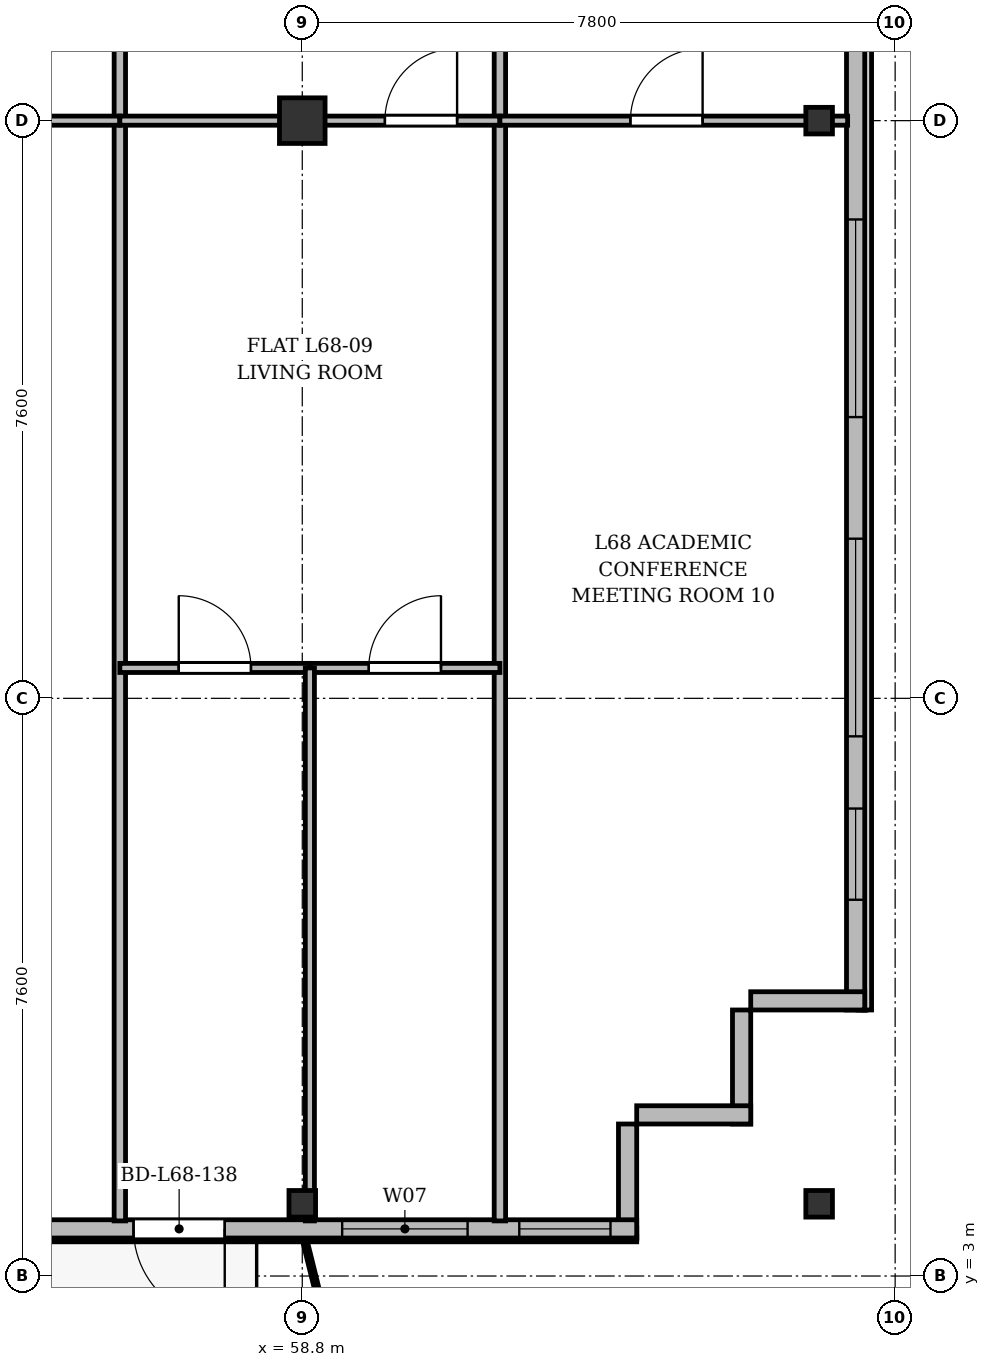
"""IFC4 building model, lengths in metres.
Left out: names, types, materials, properties, quantities, classifications, styles, units other than length and angle.
Written with IfcOpenShell. Run it as: python <this file> out.ifc"""

import sys

from ifc_helpers import new_model, si_unit, direction, frame, frame_2d, origin, origin_2d, place, context, subcontext, project, spatial, rectangle, i_section, extrude, source, transform, mapped, element, fill, save


model = new_model("IFC4")
c1 = context("Model", 3, precision=1e-05, world=origin(), true_north=direction((0.0, 1.0)))
c2 = subcontext(c1, "Body", "Model", "MODEL_VIEW")
j1 = project(units=[si_unit("LENGTHUNIT", "METRE"), si_unit("PLANEANGLEUNIT", "RADIAN")], contexts=[c1])
p1 = place(None, origin())
s1 = spatial("IfcSite", under=j1, at=p1, CompositionType="ELEMENT")
p2 = place(p1, origin())
s2 = spatial("IfcBuilding", under=s1, at=p2, CompositionType="ELEMENT")
p3 = place(p2, frame((0.0, 0.0, 263.1)))
s3 = spatial("IfcBuildingStorey", under=s2, at=p3, CompositionType="ELEMENT", Elevation=263.1)
m1 = source(origin(), c2, "Body", "SweptSolid", [
    extrude(i_section(OverallWidth=0.35, OverallDepth=0.35, WebThickness=0.018, FlangeThickness=0.028, at=origin_2d()), origin(), (0.0, 0.0, 1.0), 3.6),
])
p4 = place(p3, frame((58.8, 3.95, 0.0), z_axis=(0.0, 0.0, 1.0), x_axis=(1.0, 0.0, 0.0)))
e1 = element("IfcColumn", 1, at=p4, inside=s3, PredefinedType="COLUMN", context=c2, shape_type="MappedRepresentation", body=[
    mapped(m1, transform((0.0, 0.0, 0.0), x_axis=(1.0, 0.0, 0.0), y_axis=(0.0, 1.0, 0.0), z_axis=(0.0, 0.0, 1.0), scale=1.0)),
])
m2 = source(origin(), c2, "Body", "SweptSolid", [
    extrude(rectangle(XDim=0.6, YDim=0.6, at=origin_2d()), origin(), (0.0, 0.0, 1.0), 3.6),
])
p5 = place(p3, frame((58.8, 18.2, 0.0), z_axis=(0.0, 0.0, 1.0), x_axis=(1.0, 0.0, 0.0)))
e2 = element("IfcColumn", 2, at=p5, inside=s3, PredefinedType="COLUMN", context=c2, shape_type="MappedRepresentation", body=[
    mapped(m2, transform((0.0, 0.0, 0.0), x_axis=(1.0, 0.0, 0.0), y_axis=(0.0, 1.0, 0.0), z_axis=(0.0, 0.0, 1.0), scale=1.0)),
])
for number, where, z_axis, x_axis in (
    (3, (65.6, 3.95, 0.0), (0.0, 0.0, 1.0), (1.0, 0.0, 0.0)),
    (4, (65.6, 18.2, 0.0), (0.0, 0.0, 1.0), (1.0, 0.0, 0.0)),
):
    element("IfcColumn", number, at=place(p3, frame(where, z_axis=z_axis, x_axis=x_axis)), inside=s3, PredefinedType="COLUMN", context=c2, shape_type="MappedRepresentation", body=[
        mapped(m1, transform((0.0, 0.0, 0.0), x_axis=(1.0, 0.0, 0.0), y_axis=(0.0, 1.0, 0.0), z_axis=(0.0, 0.0, 1.0), scale=1.0)),
    ])
p6 = place(p3, frame((66.08, 45.5, 0.0), z_axis=(0.0, 0.0, 1.0), x_axis=(0.0, -1.0, 0.0)))
e5 = element("IfcWall", 5, at=p6, inside=s3, PredefinedType="SOLIDWALL", context=c2, shape_type="SweptSolid", body=[
    extrude(rectangle(XDim=39.0, YDim=0.24, at=frame_2d((19.5, 0.0))), origin(), (0.0, 0.0, 1.0), 3.37),
])
p7 = place(p6, frame((36.35, 0.0, 0.92)))
e6 = element("IfcOpeningElement", 6, at=p7, cuts=e5, PredefinedType="OPENING", context=c2, shape_type="SweptSolid", body=[
    extrude(rectangle(XDim=1.2, YDim=1.65, at=frame_2d((0.6, 0.825))), frame((0.0, 0.13, 0.0), z_axis=(0.0, -1.0, 0.0), x_axis=(1.0, 0.0, 0.0)), (0.0, 0.0, 1.0), 0.26),
])
p8 = place(p6, frame((32.8, 0.0, 0.92)))
e7 = element("IfcOpeningElement", 7, at=p8, cuts=e5, PredefinedType="OPENING", context=c2, shape_type="SweptSolid", body=[
    extrude(rectangle(XDim=2.6, YDim=1.9, at=frame_2d((1.3, 0.95))), frame((0.0, 0.13, 0.0), z_axis=(0.0, -1.0, 0.0), x_axis=(1.0, 0.0, 0.0)), (0.0, 0.0, 1.0), 0.26),
])
p9 = place(p6, frame((28.6, 0.0, 0.92)))
e8 = element("IfcOpeningElement", 8, at=p9, cuts=e5, PredefinedType="OPENING", context=c2, shape_type="SweptSolid", body=[
    extrude(rectangle(XDim=2.6, YDim=1.9, at=frame_2d((1.3, 0.95))), frame((0.0, 0.13, 0.0), z_axis=(0.0, -1.0, 0.0), x_axis=(1.0, 0.0, 0.0)), (0.0, 0.0, 1.0), 0.26),
])
p10 = place(p6, frame((21.4, 0.0, 0.92)))
e9 = element("IfcOpeningElement", 9, at=p10, cuts=e5, PredefinedType="OPENING", context=c2, shape_type="SweptSolid", body=[
    extrude(rectangle(XDim=2.6, YDim=1.9, at=frame_2d((1.3, 0.95))), frame((0.0, 0.13, 0.0), z_axis=(0.0, -1.0, 0.0), x_axis=(1.0, 0.0, 0.0)), (0.0, 0.0, 1.0), 0.26),
])
p11 = place(p6, frame((7.4, 0.0, 0.92)))
e10 = element("IfcOpeningElement", 10, at=p11, cuts=e5, PredefinedType="OPENING", context=c2, shape_type="SweptSolid", body=[
    extrude(rectangle(XDim=2.6, YDim=1.9, at=frame_2d((1.3, 0.95))), frame((0.0, 0.13, 0.0), z_axis=(0.0, -1.0, 0.0), x_axis=(1.0, 0.0, 0.0)), (0.0, 0.0, 1.0), 0.26),
])
p12 = place(p6, frame((4.5, 0.0, 0.92)))
e11 = element("IfcOpeningElement", 11, at=p12, cuts=e5, PredefinedType="OPENING", context=c2, shape_type="SweptSolid", body=[
    extrude(rectangle(XDim=1.2, YDim=1.65, at=frame_2d((0.6, 0.825))), frame((0.0, 0.13, 0.0), z_axis=(0.0, -1.0, 0.0), x_axis=(1.0, 0.0, 0.0)), (0.0, 0.0, 1.0), 0.26),
])
p13 = place(p6, frame((1.15, 0.0, 0.92)))
e12 = element("IfcOpeningElement", 12, at=p13, cuts=e5, PredefinedType="OPENING", context=c2, shape_type="SweptSolid", body=[
    extrude(rectangle(XDim=1.2, YDim=1.65, at=frame_2d((0.6, 0.825))), frame((0.0, 0.13, 0.0), z_axis=(0.0, -1.0, 0.0), x_axis=(1.0, 0.0, 0.0)), (0.0, 0.0, 1.0), 0.26),
])
p14 = place(p3, frame((66.2, 6.62, 0.0), z_axis=(0.0, 0.0, 1.0), x_axis=(-1.0, 0.0, 0.0)))
e13 = element("IfcWall", 13, at=p14, inside=s3, PredefinedType="SOLIDWALL", context=c2, shape_type="SweptSolid", body=[
    extrude(rectangle(XDim=1.5, YDim=0.24, at=frame_2d((0.75, 0.0))), origin(), (0.0, 0.0, 1.0), 2.87),
])
for number, where, z_axis, x_axis in (
    (14, (64.58, 6.5, 0.0), (0.0, 0.0, 1.0), (0.0, -1.0, 0.0)),
    (15, (64.7, 5.12, 0.0), (0.0, 0.0, 1.0), (-1.0, 0.0, 0.0)),
):
    element("IfcWall", number, at=place(p3, frame(where, z_axis=z_axis, x_axis=x_axis)), inside=s3, PredefinedType="SOLIDWALL", context=c2, shape_type="SweptSolid", body=[
        extrude(rectangle(XDim=1.5, YDim=0.24, at=frame_2d((0.75, 0.0))), origin(), (0.0, 0.0, 1.0), 3.37),
    ])
p15 = place(p3, frame((63.08, 5.0, 0.0), z_axis=(0.0, 0.0, 1.0), x_axis=(0.0, -1.0, 0.0)))
e16 = element("IfcWall", 16, at=p15, inside=s3, PredefinedType="SOLIDWALL", context=c2, shape_type="SweptSolid", body=[
    extrude(rectangle(XDim=1.5, YDim=0.24, at=frame_2d((0.75, 0.0))), origin(), (0.0, 0.0, 1.0), 2.92),
])
p16 = place(p3, frame((63.2, 3.62, 0.0), z_axis=(0.0, 0.0, 1.0), x_axis=(-1.0, 0.0, 0.0)))
e17 = element("IfcWall", 17, at=p16, inside=s3, PredefinedType="SOLIDWALL", context=c2, shape_type="SweptSolid", body=[
    extrude(rectangle(XDim=52.0, YDim=0.24, at=frame_2d((26.0, 0.0))), origin(), (0.0, 0.0, 1.0), 3.37),
])
p17 = place(p16, frame((0.345, 0.0, 0.9)))
e18 = element("IfcOpeningElement", 18, at=p17, cuts=e17, PredefinedType="OPENING", context=c2, shape_type="SweptSolid", body=[
    extrude(rectangle(XDim=1.2, YDim=1.65, at=frame_2d((0.6, 0.825))), frame((0.0, 0.13, 0.0), z_axis=(0.0, -1.0, 0.0), x_axis=(1.0, 0.0, 0.0)), (0.0, 0.0, 1.0), 0.26),
])
p18 = place(p16, frame((2.225, 0.0, 0.9)))
e19 = element("IfcOpeningElement", 19, at=p18, cuts=e17, PredefinedType="OPENING", context=c2, shape_type="SweptSolid", body=[
    extrude(rectangle(XDim=1.65, YDim=1.85, at=frame_2d((0.825, 0.925))), frame((0.0, 0.13, 0.0), z_axis=(0.0, -1.0, 0.0), x_axis=(1.0, 0.0, 0.0)), (0.0, 0.0, 1.0), 0.26),
])
p19 = place(p16, frame((5.42, 0.0, 0.0)))
e20 = element("IfcOpeningElement", 20, at=p19, cuts=e17, PredefinedType="OPENING", context=c2, shape_type="SweptSolid", body=[
    extrude(rectangle(XDim=1.2, YDim=2.2, at=frame_2d((0.6, 1.1))), frame((0.0, 0.13, 0.0), z_axis=(0.0, -1.0, 0.0), x_axis=(1.0, 0.0, 0.0)), (0.0, 0.0, 1.0), 0.26),
])
p20 = place(p16, frame((8.4, 0.0, 0.9)))
e21 = element("IfcOpeningElement", 21, at=p20, cuts=e17, PredefinedType="OPENING", context=c2, shape_type="SweptSolid", body=[
    extrude(rectangle(XDim=2.2, YDim=1.8, at=frame_2d((1.1, 0.9))), frame((0.0, 0.13, 0.0), z_axis=(0.0, -1.0, 0.0), x_axis=(1.0, 0.0, 0.0)), (0.0, 0.0, 1.0), 0.26),
])
p21 = place(p16, frame((15.05, 0.0, 0.9)))
e22 = element("IfcOpeningElement", 22, at=p21, cuts=e17, PredefinedType="OPENING", context=c2, shape_type="SweptSolid", body=[
    extrude(rectangle(XDim=1.5, YDim=1.75, at=frame_2d((0.75, 0.875))), frame((0.0, 0.13, 0.0), z_axis=(0.0, -1.0, 0.0), x_axis=(1.0, 0.0, 0.0)), (0.0, 0.0, 1.0), 0.26),
])
p22 = place(p16, frame((20.25, 0.0, 0.9)))
e23 = element("IfcOpeningElement", 23, at=p22, cuts=e17, PredefinedType="OPENING", context=c2, shape_type="SweptSolid", body=[
    extrude(rectangle(XDim=2.0, YDim=1.95, at=frame_2d((1.0, 0.975))), frame((0.0, 0.13, 0.0), z_axis=(0.0, -1.0, 0.0), x_axis=(1.0, 0.0, 0.0)), (0.0, 0.0, 1.0), 0.26),
])
p23 = place(p16, frame((24.125, 0.0, 0.9)))
e24 = element("IfcOpeningElement", 24, at=p23, cuts=e17, PredefinedType="OPENING", context=c2, shape_type="SweptSolid", body=[
    extrude(rectangle(XDim=1.65, YDim=1.85, at=frame_2d((0.825, 0.925))), frame((0.0, 0.13, 0.0), z_axis=(0.0, -1.0, 0.0), x_axis=(1.0, 0.0, 0.0)), (0.0, 0.0, 1.0), 0.26),
])
p24 = place(p16, frame((28.8, 0.0, 0.9)))
e25 = element("IfcOpeningElement", 25, at=p24, cuts=e17, PredefinedType="OPENING", context=c2, shape_type="SweptSolid", body=[
    extrude(rectangle(XDim=1.8, YDim=1.8, at=frame_2d((0.9, 0.9))), frame((0.0, 0.13, 0.0), z_axis=(0.0, -1.0, 0.0), x_axis=(1.0, 0.0, 0.0)), (0.0, 0.0, 1.0), 0.26),
])
p25 = place(p16, frame((34.078, 0.0, 0.0)))
e26 = element("IfcOpeningElement", 26, at=p25, cuts=e17, PredefinedType="OPENING", context=c2, shape_type="SweptSolid", body=[
    extrude(rectangle(XDim=1.2, YDim=2.2, at=frame_2d((0.6, 1.1))), frame((0.0, 0.13, 0.0), z_axis=(0.0, -1.0, 0.0), x_axis=(1.0, 0.0, 0.0)), (0.0, 0.0, 1.0), 0.26),
])
p26 = place(p16, frame((37.25, 0.0, 0.9)))
e27 = element("IfcOpeningElement", 27, at=p26, cuts=e17, PredefinedType="OPENING", context=c2, shape_type="SweptSolid", body=[
    extrude(rectangle(XDim=1.5, YDim=1.75, at=frame_2d((0.75, 0.875))), frame((0.0, 0.13, 0.0), z_axis=(0.0, -1.0, 0.0), x_axis=(1.0, 0.0, 0.0)), (0.0, 0.0, 1.0), 0.26),
])
p27 = place(p16, frame((40.9, 0.0, 0.9)))
e28 = element("IfcOpeningElement", 28, at=p27, cuts=e17, PredefinedType="OPENING", context=c2, shape_type="SweptSolid", body=[
    extrude(rectangle(XDim=2.0, YDim=1.95, at=frame_2d((1.0, 0.975))), frame((0.0, 0.13, 0.0), z_axis=(0.0, -1.0, 0.0), x_axis=(1.0, 0.0, 0.0)), (0.0, 0.0, 1.0), 0.26),
])
p28 = place(p16, frame((44.19, 0.0, 0.9)))
e29 = element("IfcOpeningElement", 29, at=p28, cuts=e17, PredefinedType="OPENING", context=c2, shape_type="SweptSolid", body=[
    extrude(rectangle(XDim=1.65, YDim=1.85, at=frame_2d((0.825, 0.925))), frame((0.0, 0.13, 0.0), z_axis=(0.0, -1.0, 0.0), x_axis=(1.0, 0.0, 0.0)), (0.0, 0.0, 1.0), 0.26),
])
p29 = place(p16, frame((49.855, 0.0, 0.9)))
e30 = element("IfcOpeningElement", 30, at=p29, cuts=e17, PredefinedType="OPENING", context=c2, shape_type="SweptSolid", body=[
    extrude(rectangle(XDim=1.8, YDim=1.8, at=frame_2d((0.9, 0.9))), frame((0.0, 0.13, 0.0), z_axis=(0.0, -1.0, 0.0), x_axis=(1.0, 0.0, 0.0)), (0.0, 0.0, 1.0), 0.26),
])
for number, where, z_axis, x_axis in (
    (31, (56.4, 3.725, 0.0), (0.0, 0.0, 1.0), (0.0, 1.0, 0.0)),
    (32, (61.4, 3.725, 0.0), (0.0, 0.0, 1.0), (0.0, 1.0, 0.0)),
):
    element("IfcWall", number, at=place(p3, frame(where, z_axis=z_axis, x_axis=x_axis)), inside=s3, PredefinedType="PARTITIONING", context=c2, shape_type="SweptSolid", body=[
        extrude(rectangle(XDim=27.275, YDim=0.15, at=frame_2d((13.637, 0.0))), origin(), (0.0, 0.0, 1.0), 2.92),
    ])
p30 = place(p3, frame((51.0, 18.2, 0.0), z_axis=(0.0, 0.0, 1.0), x_axis=(1.0, 0.0, 0.0)))
e33 = element("IfcWall", 33, at=p30, inside=s3, PredefinedType="PARTITIONING", context=c2, shape_type="SweptSolid", body=[
    extrude(rectangle(XDim=5.4, YDim=0.12, at=frame_2d((2.7, 0.0))), origin(), (0.0, 0.0, 1.0), 2.92),
])
p31 = place(p30, frame((2.225, 0.0, 0.0)))
e34 = element("IfcOpeningElement", 34, at=p31, cuts=e33, PredefinedType="OPENING", context=c2, shape_type="SweptSolid", body=[
    extrude(rectangle(XDim=0.95, YDim=2.15, at=frame_2d((0.475, 1.075))), frame((0.0, 0.07, 0.0), z_axis=(0.0, -1.0, 0.0), x_axis=(1.0, 0.0, 0.0)), (0.0, 0.0, 1.0), 0.14),
])
p32 = place(p3, frame((56.4, 18.2, 0.0), z_axis=(0.0, 0.0, 1.0), x_axis=(1.0, 0.0, 0.0)))
e35 = element("IfcWall", 35, at=p32, inside=s3, PredefinedType="PARTITIONING", context=c2, shape_type="SweptSolid", body=[
    extrude(rectangle(XDim=5.0, YDim=0.12, at=frame_2d((2.5, 0.0))), origin(), (0.0, 0.0, 1.0), 2.92),
])
p33 = place(p32, frame((3.487, 0.0, 0.0)))
e36 = element("IfcOpeningElement", 36, at=p33, cuts=e35, PredefinedType="OPENING", context=c2, shape_type="SweptSolid", body=[
    extrude(rectangle(XDim=0.95, YDim=2.15, at=frame_2d((0.475, 1.075))), frame((0.0, 0.07, 0.0), z_axis=(0.0, -1.0, 0.0), x_axis=(1.0, 0.0, 0.0)), (0.0, 0.0, 1.0), 0.14),
])
p34 = place(p3, frame((56.4, 11.0, 0.0), z_axis=(0.0, 0.0, 1.0), x_axis=(1.0, 0.0, 0.0)))
e37 = element("IfcWall", 37, at=p34, inside=s3, PredefinedType="PARTITIONING", context=c2, shape_type="SweptSolid", body=[
    extrude(rectangle(XDim=2.5, YDim=0.12, at=frame_2d((1.25, 0.0))), origin(), (0.0, 0.0, 1.0), 2.87),
])
p35 = place(p34, frame((0.775, 0.0, 0.0)))
e38 = element("IfcOpeningElement", 38, at=p35, cuts=e37, PredefinedType="OPENING", context=c2, shape_type="SweptSolid", body=[
    extrude(rectangle(XDim=0.95, YDim=2.15, at=frame_2d((0.475, 1.075))), frame((0.0, 0.07, 0.0), z_axis=(0.0, -1.0, 0.0), x_axis=(1.0, 0.0, 0.0)), (0.0, 0.0, 1.0), 0.14),
])
p36 = place(p3, frame((58.9, 11.0, 0.0), z_axis=(0.0, 0.0, 1.0), x_axis=(1.0, 0.0, 0.0)))
e39 = element("IfcWall", 39, at=p36, inside=s3, PredefinedType="PARTITIONING", context=c2, shape_type="SweptSolid", body=[
    extrude(rectangle(XDim=2.5, YDim=0.12, at=frame_2d((1.25, 0.0))), origin(), (0.0, 0.0, 1.0), 3.37),
])
p37 = place(p36, frame((0.775, 0.0, 0.0)))
e40 = element("IfcOpeningElement", 40, at=p37, cuts=e39, PredefinedType="OPENING", context=c2, shape_type="SweptSolid", body=[
    extrude(rectangle(XDim=0.95, YDim=2.15, at=frame_2d((0.475, 1.075))), frame((0.0, 0.07, 0.0), z_axis=(0.0, -1.0, 0.0), x_axis=(1.0, 0.0, 0.0)), (0.0, 0.0, 1.0), 0.14),
])
p38 = place(p3, frame((58.9, 3.725, 0.0), z_axis=(0.0, 0.0, 1.0), x_axis=(0.0, 1.0, 0.0)))
e41 = element("IfcWall", 41, at=p38, inside=s3, PredefinedType="PARTITIONING", context=c2, shape_type="SweptSolid", body=[
    extrude(rectangle(XDim=7.275, YDim=0.12, at=frame_2d((3.637, 0.0))), origin(), (0.0, 0.0, 1.0), 2.87),
])
p39 = place(p3, frame((61.4, 18.2, 0.0), z_axis=(0.0, 0.0, 1.0), x_axis=(1.0, 0.0, 0.0)))
e42 = element("IfcWall", 42, at=p39, inside=s3, PredefinedType="PARTITIONING", context=c2, shape_type="SweptSolid", body=[
    extrude(rectangle(XDim=4.575, YDim=0.12, at=frame_2d((2.288, 0.0))), origin(), (0.0, 0.0, 1.0), 2.92),
])
p40 = place(p39, frame((1.717, 0.0, 0.0)))
e43 = element("IfcOpeningElement", 43, at=p40, cuts=e42, PredefinedType="OPENING", context=c2, shape_type="SweptSolid", body=[
    extrude(rectangle(XDim=0.95, YDim=2.15, at=frame_2d((0.475, 1.075))), frame((0.0, 0.07, 0.0), z_axis=(0.0, -1.0, 0.0), x_axis=(1.0, 0.0, 0.0)), (0.0, 0.0, 1.0), 0.14),
])
m3 = source(origin(), c2, "Body", "SweptSolid", [
    extrude(rectangle(XDim=1.2, YDim=1.65, at=frame_2d((0.6, 0.825))), frame((0.0, 0.03, 0.0), z_axis=(0.0, -1.0, 0.0), x_axis=(1.0, 0.0, 0.0)), (0.0, 0.0, 1.0), 0.06),
])
p41 = place(p7, origin())
e44 = element("IfcWindow", 44, at=p41, inside=s3, PartitioningType="SINGLE_PANEL", PredefinedType="WINDOW", context=c2, shape_type="MappedRepresentation", body=[
    mapped(m3, transform((0.0, 0.0, 0.0), x_axis=(1.0, 0.0, 0.0), y_axis=(0.0, 1.0, 0.0), z_axis=(0.0, 0.0, 1.0), scale=1.0)),
])
fill(e6, e44)
m4 = source(origin(), c2, "Body", "SweptSolid", [
    extrude(rectangle(XDim=2.6, YDim=1.9, at=frame_2d((1.3, 0.95))), frame((0.0, 0.03, 0.0), z_axis=(0.0, -1.0, 0.0), x_axis=(1.0, 0.0, 0.0)), (0.0, 0.0, 1.0), 0.06),
])
p42 = place(p8, origin())
e45 = element("IfcWindow", 45, at=p42, inside=s3, PartitioningType="SINGLE_PANEL", PredefinedType="WINDOW", context=c2, shape_type="MappedRepresentation", body=[
    mapped(m4, transform((0.0, 0.0, 0.0), x_axis=(1.0, 0.0, 0.0), y_axis=(0.0, 1.0, 0.0), z_axis=(0.0, 0.0, 1.0), scale=1.0)),
])
fill(e7, e45)
p43 = place(p9, origin())
e46 = element("IfcWindow", 46, at=p43, inside=s3, PartitioningType="SINGLE_PANEL", PredefinedType="WINDOW", context=c2, shape_type="MappedRepresentation", body=[
    mapped(m4, transform((0.0, 0.0, 0.0), x_axis=(1.0, 0.0, 0.0), y_axis=(0.0, 1.0, 0.0), z_axis=(0.0, 0.0, 1.0), scale=1.0)),
])
fill(e8, e46)
p44 = place(p17, origin())
e47 = element("IfcWindow", 47, at=p44, inside=s3, PartitioningType="SINGLE_PANEL", PredefinedType="WINDOW", context=c2, shape_type="MappedRepresentation", body=[
    mapped(m3, transform((0.0, 0.0, 0.0), x_axis=(1.0, 0.0, 0.0), y_axis=(0.0, 1.0, 0.0), z_axis=(0.0, 0.0, 1.0), scale=1.0)),
])
fill(e18, e47)
m5 = source(origin(), c2, "Body", "SweptSolid", [
    extrude(rectangle(XDim=1.65, YDim=1.85, at=frame_2d((0.825, 0.925))), frame((0.0, 0.03, 0.0), z_axis=(0.0, -1.0, 0.0), x_axis=(1.0, 0.0, 0.0)), (0.0, 0.0, 1.0), 0.06),
])
p45 = place(p18, origin())
e48 = element("IfcWindow", 48, at=p45, inside=s3, PartitioningType="SINGLE_PANEL", PredefinedType="WINDOW", context=c2, shape_type="MappedRepresentation", body=[
    mapped(m5, transform((0.0, 0.0, 0.0), x_axis=(1.0, 0.0, 0.0), y_axis=(0.0, 1.0, 0.0), z_axis=(0.0, 0.0, 1.0), scale=1.0)),
])
fill(e19, e48)
m6 = source(origin(), c2, "Body", "SweptSolid", [
    extrude(rectangle(XDim=1.2, YDim=2.2, at=frame_2d((0.6, 1.1))), frame((0.0, 0.025, 0.0), z_axis=(0.0, -1.0, 0.0), x_axis=(1.0, 0.0, 0.0)), (0.0, 0.0, 1.0), 0.05),
])
p46 = place(p19, origin())
e49 = element("IfcDoor", 49, at=p46, inside=s3, OperationType="SINGLE_SWING_LEFT", PredefinedType="DOOR", context=c2, shape_type="MappedRepresentation", body=[
    mapped(m6, transform((0.0, 0.0, 0.0), x_axis=(1.0, 0.0, 0.0), y_axis=(0.0, 1.0, 0.0), z_axis=(0.0, 0.0, 1.0), scale=1.0)),
])
fill(e20, e49)
m7 = source(origin(), c2, "Body", "SweptSolid", [
    extrude(rectangle(XDim=0.95, YDim=2.15, at=frame_2d((0.475, 1.075))), frame((0.0, 0.025, 0.0), z_axis=(0.0, -1.0, 0.0), x_axis=(1.0, 0.0, 0.0)), (0.0, 0.0, 1.0), 0.05),
])
p47 = place(p33, origin())
e50 = element("IfcDoor", 50, at=p47, inside=s3, OperationType="SINGLE_SWING_RIGHT", PredefinedType="DOOR", context=c2, shape_type="MappedRepresentation", body=[
    mapped(m7, transform((0.0, 0.0, 0.0), x_axis=(1.0, 0.0, 0.0), y_axis=(0.0, 1.0, 0.0), z_axis=(0.0, 0.0, 1.0), scale=1.0)),
])
fill(e36, e50)
p48 = place(p35, origin())
e51 = element("IfcDoor", 51, at=p48, inside=s3, OperationType="SINGLE_SWING_LEFT", PredefinedType="DOOR", context=c2, shape_type="MappedRepresentation", body=[
    mapped(m7, transform((0.0, 0.0, 0.0), x_axis=(1.0, 0.0, 0.0), y_axis=(0.0, 1.0, 0.0), z_axis=(0.0, 0.0, 1.0), scale=1.0)),
])
fill(e38, e51)
p49 = place(p37, origin())
e52 = element("IfcDoor", 52, at=p49, inside=s3, OperationType="SINGLE_SWING_RIGHT", PredefinedType="DOOR", context=c2, shape_type="MappedRepresentation", body=[
    mapped(m7, transform((0.0, 0.0, 0.0), x_axis=(1.0, 0.0, 0.0), y_axis=(0.0, 1.0, 0.0), z_axis=(0.0, 0.0, 1.0), scale=1.0)),
])
fill(e40, e52)
p50 = place(p40, origin())
e53 = element("IfcDoor", 53, at=p50, inside=s3, OperationType="SINGLE_SWING_RIGHT", PredefinedType="DOOR", context=c2, shape_type="MappedRepresentation", body=[
    mapped(m7, transform((0.0, 0.0, 0.0), x_axis=(1.0, 0.0, 0.0), y_axis=(0.0, 1.0, 0.0), z_axis=(0.0, 0.0, 1.0), scale=1.0)),
])
fill(e43, e53)
save(model, sys.argv[1])
